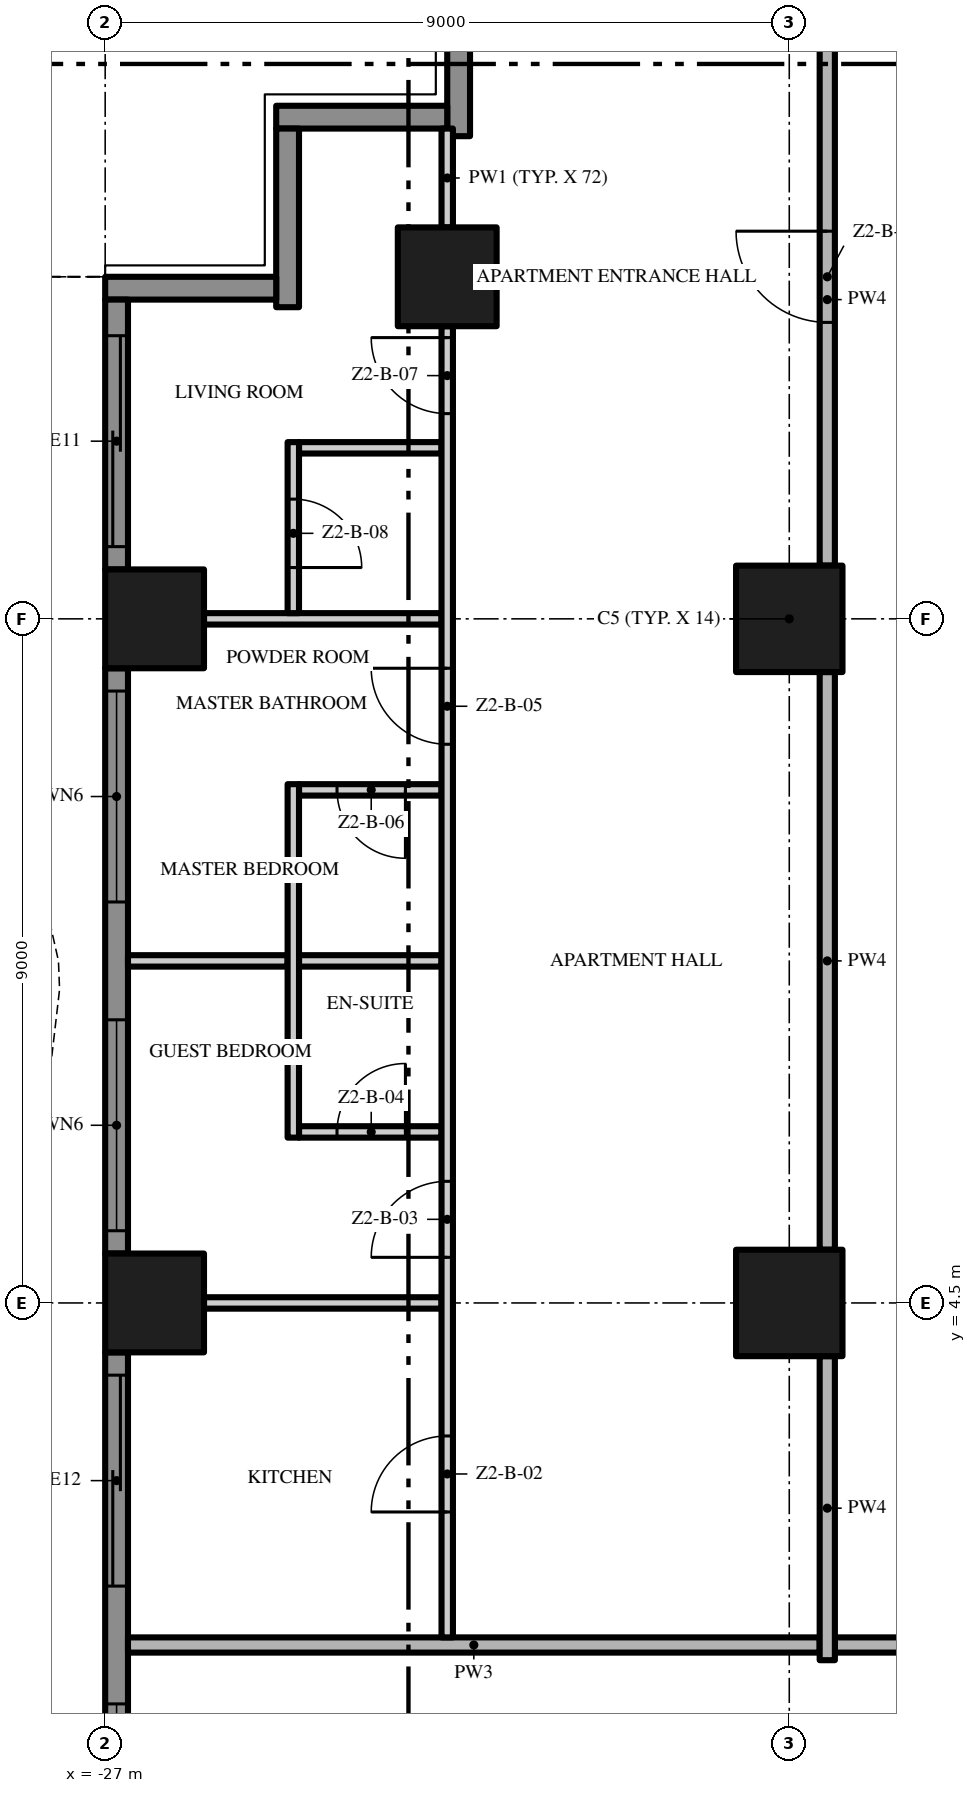
"""IFC4 building model, lengths in metres.
Left out: names, types, materials, properties, quantities, classifications, styles, units other than length and angle.
Written with IfcOpenShell. Run it as: python <this file> out.ifc"""

import sys

from ifc_helpers import new_model, si_unit, direction, frame, frame_2d, origin, origin_2d, place, context, subcontext, project, spatial, polyline, rectangle, outline, extrude, element, fill, save


model = new_model("IFC4")
c1 = context("Model", 3, precision=1e-05, world=origin(), true_north=direction((0.0, 1.0)))
c2 = subcontext(c1, "Body", "Model", "MODEL_VIEW")
j1 = project(units=[si_unit("LENGTHUNIT", "METRE"), si_unit("PLANEANGLEUNIT", "RADIAN")], contexts=[c1])
p1 = place(None, origin())
s1 = spatial("IfcSite", under=j1, at=p1, CompositionType="ELEMENT")
p2 = place(p1, origin())
s2 = spatial("IfcBuilding", under=s1, at=p2, CompositionType="ELEMENT")
p3 = place(p2, frame((0.0, 0.0, 80.8)))
s3 = spatial("IfcBuildingStorey", under=s2, at=p3, CompositionType="ELEMENT", Elevation=80.8)
for number, where, z_axis, x_axis in (
    (1, (-18.0, 13.5, 0.0), (0.0, 0.0, 1.0), (1.0, 0.0, 0.0)),
    (2, (-18.0, 4.5, 0.0), (0.0, 0.0, 1.0), (1.0, 0.0, 0.0)),
):
    element("IfcColumn", number, at=place(p3, frame(where, z_axis=z_axis, x_axis=x_axis)), inside=s3, PredefinedType="COLUMN", context=c2, shape_type="SweptSolid", body=[
        extrude(rectangle(XDim=1.4, YDim=1.4, at=origin_2d()), origin(), (0.0, 0.0, 1.0), 3.5),
    ])
for number, where, z_axis, x_axis in (
    (3, (-26.35, 13.5, 0.0), (0.0, 0.0, 1.0), (1.0, 0.0, 0.0)),
    (4, (-22.5, 18.0, 0.0), (0.0, 0.0, 1.0), (1.0, 0.0, 0.0)),
    (5, (-26.35, 4.5, 0.0), (0.0, 0.0, 1.0), (1.0, 0.0, 0.0)),
):
    element("IfcColumn", number, at=place(p3, frame(where, z_axis=z_axis, x_axis=x_axis)), inside=s3, PredefinedType="COLUMN", context=c2, shape_type="SweptSolid", body=[
        extrude(rectangle(XDim=1.3, YDim=1.3, at=origin_2d()), origin(), (0.0, 0.0, 1.0), 3.5),
    ])
p4 = place(p3, frame((-22.35, 19.85, 0.0), z_axis=(0.0, 0.0, 1.0), x_axis=(0.0, 1.0, 0.0)))
e6 = element("IfcWall", 6, at=p4, inside=s3, PredefinedType="SOLIDWALL", context=c2, shape_type="SweptSolid", body=[
    extrude(rectangle(XDim=2.35, YDim=0.3, at=frame_2d((1.175, 0.0))), origin(), (0.0, 0.0, 1.0), 3.5),
])
p5 = place(p3, frame((-24.75, 20.1, 0.0), z_axis=(0.0, 0.0, 1.0), x_axis=(1.0, 0.0, 0.0)))
e7 = element("IfcWall", 7, at=p5, inside=s3, PredefinedType="SOLIDWALL", context=c2, shape_type="SweptSolid", body=[
    extrude(rectangle(XDim=2.25, YDim=0.3, at=frame_2d((1.125, 0.0))), origin(), (0.0, 0.0, 1.0), 3.5),
])
p6 = place(p3, frame((-24.6, 17.6, 0.0), z_axis=(0.0, 0.0, 1.0), x_axis=(0.0, 1.0, 0.0)))
e8 = element("IfcWall", 8, at=p6, inside=s3, PredefinedType="SOLIDWALL", context=c2, shape_type="SweptSolid", body=[
    extrude(rectangle(XDim=2.35, YDim=0.3, at=frame_2d((1.175, 0.0))), origin(), (0.0, 0.0, 1.0), 3.5),
])
p7 = place(p3, frame((-27.0, 17.85, 0.0), z_axis=(0.0, 0.0, 1.0), x_axis=(1.0, 0.0, 0.0)))
e9 = element("IfcWall", 9, at=p7, inside=s3, PredefinedType="SOLIDWALL", context=c2, shape_type="SweptSolid", body=[
    extrude(rectangle(XDim=2.25, YDim=0.3, at=frame_2d((1.125, 0.0))), origin(), (0.0, 0.0, 1.0), 3.5),
])
p8 = place(p3, frame((-26.85, 14.15, 0.0), z_axis=(0.0, 0.0, 1.0), x_axis=(0.0, 1.0, 0.0)))
e10 = element("IfcWall", 10, at=p8, inside=s3, PredefinedType="SOLIDWALL", context=c2, shape_type="SweptSolid", body=[
    extrude(rectangle(XDim=3.55, YDim=0.3, at=frame_2d((1.775, 0.0))), origin(), (0.0, 0.0, 1.0), 3.5),
])
p9 = place(p8, frame((0.3, 0.0, 0.0)))
e11 = element("IfcOpeningElement", 11, at=p9, cuts=e10, PredefinedType="OPENING", context=c2, shape_type="SweptSolid", body=[
    extrude(rectangle(XDim=2.775, YDim=2.4, at=frame_2d((1.387, 1.2))), frame((0.0, 0.16, 0.0), z_axis=(0.0, -1.0, 0.0), x_axis=(1.0, 0.0, 0.0)), (0.0, 0.0, 1.0), 0.32),
])
p10 = place(p3, frame((-26.85, 5.15, 0.0), z_axis=(0.0, 0.0, 1.0), x_axis=(0.0, 1.0, 0.0)))
e12 = element("IfcWall", 12, at=p10, inside=s3, PredefinedType="SOLIDWALL", context=c2, shape_type="SweptSolid", body=[
    extrude(rectangle(XDim=7.7, YDim=0.3, at=frame_2d((3.85, 0.0))), origin(), (0.0, 0.0, 1.0), 3.5),
])
p11 = place(p10, frame((4.625, 0.0, 0.45)))
e13 = element("IfcOpeningElement", 13, at=p11, cuts=e12, PredefinedType="OPENING", context=c2, shape_type="SweptSolid", body=[
    extrude(rectangle(XDim=2.775, YDim=2.65, at=frame_2d((1.387, 1.325))), frame((0.0, 0.16, 0.0), z_axis=(0.0, -1.0, 0.0), x_axis=(1.0, 0.0, 0.0)), (0.0, 0.0, 1.0), 0.32),
])
p12 = place(p10, frame((0.3, 0.0, 0.45)))
e14 = element("IfcOpeningElement", 14, at=p12, cuts=e12, PredefinedType="OPENING", context=c2, shape_type="SweptSolid", body=[
    extrude(rectangle(XDim=2.775, YDim=2.65, at=frame_2d((1.387, 1.325))), frame((0.0, 0.16, 0.0), z_axis=(0.0, -1.0, 0.0), x_axis=(1.0, 0.0, 0.0)), (0.0, 0.0, 1.0), 0.32),
])
p13 = place(p3, frame((-26.85, -3.85, 0.0), z_axis=(0.0, 0.0, 1.0), x_axis=(0.0, 1.0, 0.0)))
e15 = element("IfcWall", 15, at=p13, inside=s3, PredefinedType="SOLIDWALL", context=c2, shape_type="SweptSolid", body=[
    extrude(rectangle(XDim=7.7, YDim=0.3, at=frame_2d((3.85, 0.0))), origin(), (0.0, 0.0, 1.0), 3.5),
])
p14 = place(p13, frame((4.625, 0.0, 0.0)))
e16 = element("IfcOpeningElement", 16, at=p14, cuts=e15, PredefinedType="OPENING", context=c2, shape_type="SweptSolid", body=[
    extrude(rectangle(XDim=2.775, YDim=2.4, at=frame_2d((1.387, 1.2))), frame((0.0, 0.16, 0.0), z_axis=(0.0, -1.0, 0.0), x_axis=(1.0, 0.0, 0.0)), (0.0, 0.0, 1.0), 0.32),
])
p15 = place(p13, frame((0.3, 0.0, 0.45)))
e17 = element("IfcOpeningElement", 17, at=p15, cuts=e15, PredefinedType="OPENING", context=c2, shape_type="SweptSolid", body=[
    extrude(rectangle(XDim=2.775, YDim=2.65, at=frame_2d((1.387, 1.325))), frame((0.0, 0.16, 0.0), z_axis=(0.0, -1.0, 0.0), x_axis=(1.0, 0.0, 0.0)), (0.0, 0.0, 1.0), 0.32),
])
p16 = place(p3, origin())
e18 = element("IfcWall", 18, at=p16, inside=s3, PredefinedType="USERDEFINED", context=c2, shape_type="SweptSolid", body=[
    extrude(outline(polyline([(-29.649, 18.0), (-29.985, 16.5), (-30.0, 16.125), (-29.869, 15.0), (-29.345, 13.5), (-28.612, 12.0), (-27.951, 10.5), (-27.615, 9.0), (-27.6, 8.625), (-27.731, 7.5), (-28.255, 6.0), (-28.988, 4.5), (-29.649, 3.0), (-29.985, 1.5), (-30.0, 1.125), (-29.869, 0.0), (-29.345, -1.5), (-28.612, -3.0), (-27.951, -4.5), (-27.615, -6.0), (-27.6, -6.375), (-27.731, -7.5), (-28.255, -9.0), (-28.988, -10.5), (-29.649, -12.0), (-29.985, -13.5), (-30.0, -13.875), (-29.869, -15.0), (-29.345, -16.5), (-28.612, -18.0), (-28.388, -17.89), (-29.114, -16.404), (-29.624, -14.944), (-29.749, -13.865), (-29.736, -13.533), (-29.41, -12.079), (-28.761, -10.605), (-28.024, -9.096), (-27.486, -7.556), (-27.349, -6.385), (-27.366, -5.967), (-27.713, -4.421), (-28.385, -2.895), (-29.114, -1.404), (-29.624, 0.056), (-29.749, 1.135), (-29.736, 1.467), (-29.41, 2.921), (-28.761, 4.395), (-28.024, 5.904), (-27.486, 7.444), (-27.349, 8.615), (-27.366, 9.033), (-27.713, 10.579), (-28.385, 12.105), (-29.114, 13.596), (-29.624, 15.056), (-29.749, 16.135), (-29.736, 16.467), (-29.405, 17.945), (-29.649, 18.0)])), origin(), (0.0, 0.0, 1.0), 0.9),
])
p17 = place(p3, frame((-0.1, 0.0, 0.0), z_axis=(0.0, 0.0, 1.0), x_axis=(-1.0, 0.0, 0.0)))
e19 = element("IfcWall", 19, at=p17, inside=s3, PredefinedType="PARTITIONING", context=c2, shape_type="SweptSolid", body=[
    extrude(rectangle(XDim=17.3, YDim=0.2, at=frame_2d((8.65, 0.0))), origin(), (0.0, 0.0, 1.0), 3.5),
])
p18 = place(p17, frame((8.15, 0.0, 0.0)))
e20 = element("IfcOpeningElement", 20, at=p18, cuts=e19, PredefinedType="OPENING", context=c2, shape_type="SweptSolid", body=[
    extrude(rectangle(XDim=1.5, YDim=2.4, at=frame_2d((0.75, 1.2))), frame((0.0, 0.11, 0.0), z_axis=(0.0, -1.0, 0.0), x_axis=(1.0, 0.0, 0.0)), (0.0, 0.0, 1.0), 0.22),
])
p19 = place(p3, frame((-26.7, 0.0, 0.0), z_axis=(0.0, 0.0, 1.0), x_axis=(1.0, 0.0, 0.0)))
e21 = element("IfcWall", 21, at=p19, inside=s3, PredefinedType="PARTITIONING", context=c2, shape_type="SweptSolid", body=[
    extrude(rectangle(XDim=9.1, YDim=0.2, at=frame_2d((4.55, 0.0))), origin(), (0.0, 0.0, 1.0), 3.5),
])
p20 = place(p3, frame((-25.7, 4.5, 0.0), z_axis=(0.0, 0.0, 1.0), x_axis=(1.0, 0.0, 0.0)))
e22 = element("IfcWall", 22, at=p20, inside=s3, PredefinedType="PARTITIONING", context=c2, shape_type="SweptSolid", body=[
    extrude(rectangle(XDim=3.125, YDim=0.15, at=frame_2d((1.562, 0.0))), origin(), (0.0, 0.0, 1.0), 3.5),
])
p21 = place(p3, frame((-24.45, 6.75, 0.0), z_axis=(0.0, 0.0, 1.0), x_axis=(1.0, 0.0, 0.0)))
e23 = element("IfcWall", 23, at=p21, inside=s3, PredefinedType="PARTITIONING", context=c2, shape_type="SweptSolid", body=[
    extrude(rectangle(XDim=1.875, YDim=0.15, at=frame_2d((0.938, 0.0))), origin(), (0.0, 0.0, 1.0), 3.5),
])
p22 = place(p21, frame((0.5, 0.0, 0.0)))
e24 = element("IfcOpeningElement", 24, at=p22, cuts=e23, PredefinedType="OPENING", context=c2, shape_type="SweptSolid", body=[
    extrude(rectangle(XDim=0.9, YDim=2.1, at=frame_2d((0.45, 1.05))), frame((0.0, 0.085, 0.0), z_axis=(0.0, -1.0, 0.0), x_axis=(1.0, 0.0, 0.0)), (0.0, 0.0, 1.0), 0.17),
])
p23 = place(p3, frame((-26.7, 9.0, 0.0), z_axis=(0.0, 0.0, 1.0), x_axis=(1.0, 0.0, 0.0)))
e25 = element("IfcWall", 25, at=p23, inside=s3, PredefinedType="PARTITIONING", context=c2, shape_type="SweptSolid", body=[
    extrude(rectangle(XDim=2.1, YDim=0.15, at=frame_2d((1.05, 0.0))), origin(), (0.0, 0.0, 1.0), 3.5),
])
p24 = place(p3, frame((-24.45, 9.0, 0.0), z_axis=(0.0, 0.0, 1.0), x_axis=(1.0, 0.0, 0.0)))
e26 = element("IfcWall", 26, at=p24, inside=s3, PredefinedType="PARTITIONING", context=c2, shape_type="SweptSolid", body=[
    extrude(rectangle(XDim=1.875, YDim=0.15, at=frame_2d((0.938, 0.0))), origin(), (0.0, 0.0, 1.0), 3.5),
])
p25 = place(p3, frame((-22.575, 11.25, 0.0), z_axis=(0.0, 0.0, 1.0), x_axis=(-1.0, 0.0, 0.0)))
e27 = element("IfcWall", 27, at=p25, inside=s3, PredefinedType="PARTITIONING", context=c2, shape_type="SweptSolid", body=[
    extrude(rectangle(XDim=1.875, YDim=0.15, at=frame_2d((0.938, 0.0))), origin(), (0.0, 0.0, 1.0), 3.5),
])
p26 = place(p25, frame((0.475, 0.0, 0.0)))
e28 = element("IfcOpeningElement", 28, at=p26, cuts=e27, PredefinedType="OPENING", context=c2, shape_type="SweptSolid", body=[
    extrude(rectangle(XDim=0.9, YDim=2.1, at=frame_2d((0.45, 1.05))), frame((0.0, 0.085, 0.0), z_axis=(0.0, -1.0, 0.0), x_axis=(1.0, 0.0, 0.0)), (0.0, 0.0, 1.0), 0.17),
])
p27 = place(p3, frame((-25.7, 13.5, 0.0), z_axis=(0.0, 0.0, 1.0), x_axis=(1.0, 0.0, 0.0)))
e29 = element("IfcWall", 29, at=p27, inside=s3, PredefinedType="PARTITIONING", context=c2, shape_type="SweptSolid", body=[
    extrude(rectangle(XDim=3.125, YDim=0.15, at=frame_2d((1.562, 0.0))), origin(), (0.0, 0.0, 1.0), 3.5),
])
p28 = place(p3, frame((-24.45, 15.75, 0.0), z_axis=(0.0, 0.0, 1.0), x_axis=(1.0, 0.0, 0.0)))
e30 = element("IfcWall", 30, at=p28, inside=s3, PredefinedType="PARTITIONING", context=c2, shape_type="SweptSolid", body=[
    extrude(rectangle(XDim=1.875, YDim=0.15, at=frame_2d((0.938, 0.0))), origin(), (0.0, 0.0, 1.0), 3.5),
])
p29 = place(p3, frame((-24.525, 6.675, 0.0), z_axis=(0.0, 0.0, 1.0), x_axis=(0.0, 1.0, 0.0)))
e31 = element("IfcWall", 31, at=p29, inside=s3, PredefinedType="PARTITIONING", context=c2, shape_type="SweptSolid", body=[
    extrude(rectangle(XDim=4.65, YDim=0.15, at=frame_2d((2.325, 0.0))), origin(), (0.0, 0.0, 1.0), 3.5),
])
p30 = place(p3, frame((-24.525, 15.825, 0.0), z_axis=(0.0, 0.0, 1.0), x_axis=(0.0, -1.0, 0.0)))
e32 = element("IfcWall", 32, at=p30, inside=s3, PredefinedType="PARTITIONING", context=c2, shape_type="SweptSolid", body=[
    extrude(rectangle(XDim=2.25, YDim=0.15, at=frame_2d((1.125, 0.0))), origin(), (0.0, 0.0, 1.0), 3.5),
])
p31 = place(p30, frame((0.75, 0.0, 0.0)))
e33 = element("IfcOpeningElement", 33, at=p31, cuts=e32, PredefinedType="OPENING", context=c2, shape_type="SweptSolid", body=[
    extrude(rectangle(XDim=0.9, YDim=2.1, at=frame_2d((0.45, 1.05))), frame((0.0, 0.085, 0.0), z_axis=(0.0, -1.0, 0.0), x_axis=(1.0, 0.0, 0.0)), (0.0, 0.0, 1.0), 0.17),
])
p32 = place(p3, frame((-22.5, 0.1, 0.0), z_axis=(0.0, 0.0, 1.0), x_axis=(0.0, 1.0, 0.0)))
e34 = element("IfcWall", 34, at=p32, inside=s3, PredefinedType="PARTITIONING", context=c2, shape_type="SweptSolid", body=[
    extrude(rectangle(XDim=17.25, YDim=0.15, at=frame_2d((8.625, 0.0))), origin(), (0.0, 0.0, 1.0), 3.5),
])
p33 = place(p32, frame((1.65, 0.0, 0.0)))
e35 = element("IfcOpeningElement", 35, at=p33, cuts=e34, PredefinedType="OPENING", context=c2, shape_type="SweptSolid", body=[
    extrude(rectangle(XDim=1.0, YDim=2.4, at=frame_2d((0.5, 1.2))), frame((0.0, 0.085, 0.0), z_axis=(0.0, -1.0, 0.0), x_axis=(1.0, 0.0, 0.0)), (0.0, 0.0, 1.0), 0.17),
])
p34 = place(p32, frame((5.0, 0.0, 0.0)))
e36 = element("IfcOpeningElement", 36, at=p34, cuts=e34, PredefinedType="OPENING", context=c2, shape_type="SweptSolid", body=[
    extrude(rectangle(XDim=1.0, YDim=2.4, at=frame_2d((0.5, 1.2))), frame((0.0, 0.085, 0.0), z_axis=(0.0, -1.0, 0.0), x_axis=(1.0, 0.0, 0.0)), (0.0, 0.0, 1.0), 0.17),
])
p35 = place(p32, frame((11.75, 0.0, 0.0)))
e37 = element("IfcOpeningElement", 37, at=p35, cuts=e34, PredefinedType="OPENING", context=c2, shape_type="SweptSolid", body=[
    extrude(rectangle(XDim=1.0, YDim=2.4, at=frame_2d((0.5, 1.2))), frame((0.0, 0.085, 0.0), z_axis=(0.0, -1.0, 0.0), x_axis=(1.0, 0.0, 0.0)), (0.0, 0.0, 1.0), 0.17),
])
p36 = place(p32, frame((16.1, 0.0, 0.0)))
e38 = element("IfcOpeningElement", 38, at=p36, cuts=e34, PredefinedType="OPENING", context=c2, shape_type="SweptSolid", body=[
    extrude(rectangle(XDim=1.0, YDim=2.4, at=frame_2d((0.5, 1.2))), frame((0.0, 0.085, 0.0), z_axis=(0.0, -1.0, 0.0), x_axis=(1.0, 0.0, 0.0)), (0.0, 0.0, 1.0), 0.17),
])
p37 = place(p3, frame((-22.5, 18.65, 0.0), z_axis=(0.0, 0.0, 1.0), x_axis=(0.0, 1.0, 0.0)))
e39 = element("IfcWall", 39, at=p37, inside=s3, PredefinedType="PARTITIONING", context=c2, shape_type="SweptSolid", body=[
    extrude(rectangle(XDim=1.3, YDim=0.15, at=frame_2d((0.65, 0.0))), origin(), (0.0, 0.0, 1.0), 3.5),
])
p38 = place(p3, frame((-17.5, -0.2, 0.0), z_axis=(0.0, 0.0, 1.0), x_axis=(0.0, 1.0, 0.0)))
e40 = element("IfcWall", 40, at=p38, inside=s3, PredefinedType="PARTITIONING", context=c2, shape_type="SweptSolid", body=[
    extrude(rectangle(XDim=4.0, YDim=0.2, at=frame_2d((2.0, 0.0))), origin(), (0.0, 0.0, 1.0), 3.5),
])
p39 = place(p3, frame((-17.5, 5.2, 0.0), z_axis=(0.0, 0.0, 1.0), x_axis=(0.0, 1.0, 0.0)))
e41 = element("IfcWall", 41, at=p39, inside=s3, PredefinedType="PARTITIONING", context=c2, shape_type="SweptSolid", body=[
    extrude(rectangle(XDim=7.6, YDim=0.2, at=frame_2d((3.8, 0.0))), origin(), (0.0, 0.0, 1.0), 3.5),
])
p40 = place(p3, frame((-17.5, 14.2, 0.0), z_axis=(0.0, 0.0, 1.0), x_axis=(0.0, 1.0, 0.0)))
e42 = element("IfcWall", 42, at=p40, inside=s3, PredefinedType="PARTITIONING", context=c2, shape_type="SweptSolid", body=[
    extrude(rectangle(XDim=7.0, YDim=0.2, at=frame_2d((3.5, 0.0))), origin(), (0.0, 0.0, 1.0), 3.5),
])
p41 = place(p40, frame((3.2, 0.0, 0.0)))
e43 = element("IfcOpeningElement", 43, at=p41, cuts=e42, PredefinedType="OPENING", context=c2, shape_type="SweptSolid", body=[
    extrude(rectangle(XDim=1.2, YDim=2.4, at=frame_2d((0.6, 1.2))), frame((0.0, 0.11, 0.0), z_axis=(0.0, -1.0, 0.0), x_axis=(1.0, 0.0, 0.0)), (0.0, 0.0, 1.0), 0.22),
])
p42 = place(p9, origin())
e44 = element("IfcDoor", 44, at=p42, inside=s3, OperationType="SINGLE_SWING_LEFT", PredefinedType="DOOR", context=c2, shape_type="SweptSolid", body=[
    extrude(rectangle(XDim=2.775, YDim=2.4, at=frame_2d((1.387, 1.2))), frame((0.0, 0.025, 0.0), z_axis=(0.0, -1.0, 0.0), x_axis=(1.0, 0.0, 0.0)), (0.0, 0.0, 1.0), 0.05),
])
fill(e11, e44)
p43 = place(p11, origin())
e45 = element("IfcWindow", 45, at=p43, inside=s3, PartitioningType="SINGLE_PANEL", PredefinedType="WINDOW", context=c2, shape_type="SweptSolid", body=[
    extrude(rectangle(XDim=2.775, YDim=2.65, at=frame_2d((1.387, 1.325))), frame((0.0, 0.03, 0.0), z_axis=(0.0, -1.0, 0.0), x_axis=(1.0, 0.0, 0.0)), (0.0, 0.0, 1.0), 0.06),
])
fill(e13, e45)
p44 = place(p12, origin())
e46 = element("IfcWindow", 46, at=p44, inside=s3, PartitioningType="SINGLE_PANEL", PredefinedType="WINDOW", context=c2, shape_type="SweptSolid", body=[
    extrude(rectangle(XDim=2.775, YDim=2.65, at=frame_2d((1.387, 1.325))), frame((0.0, 0.03, 0.0), z_axis=(0.0, -1.0, 0.0), x_axis=(1.0, 0.0, 0.0)), (0.0, 0.0, 1.0), 0.06),
])
fill(e14, e46)
p45 = place(p14, origin())
e47 = element("IfcDoor", 47, at=p45, inside=s3, OperationType="SINGLE_SWING_LEFT", PredefinedType="DOOR", context=c2, shape_type="SweptSolid", body=[
    extrude(rectangle(XDim=2.775, YDim=2.4, at=frame_2d((1.387, 1.2))), frame((0.0, 0.025, 0.0), z_axis=(0.0, -1.0, 0.0), x_axis=(1.0, 0.0, 0.0)), (0.0, 0.0, 1.0), 0.05),
])
fill(e16, e47)
p46 = place(p15, origin())
e48 = element("IfcWindow", 48, at=p46, inside=s3, PartitioningType="SINGLE_PANEL", PredefinedType="WINDOW", context=c2, shape_type="SweptSolid", body=[
    extrude(rectangle(XDim=2.775, YDim=2.65, at=frame_2d((1.387, 1.325))), frame((0.0, 0.03, 0.0), z_axis=(0.0, -1.0, 0.0), x_axis=(1.0, 0.0, 0.0)), (0.0, 0.0, 1.0), 0.06),
])
fill(e17, e48)
p47 = place(p41, origin())
e49 = element("IfcDoor", 49, at=p47, inside=s3, OperationType="SINGLE_SWING_RIGHT", PredefinedType="DOOR", context=c2, shape_type="SweptSolid", body=[
    extrude(rectangle(XDim=1.2, YDim=2.4, at=frame_2d((0.6, 1.2))), frame((0.0, 0.025, 0.0), z_axis=(0.0, -1.0, 0.0), x_axis=(1.0, 0.0, 0.0)), (0.0, 0.0, 1.0), 0.05),
])
fill(e43, e49)
p48 = place(p33, origin())
e50 = element("IfcDoor", 50, at=p48, inside=s3, OperationType="SINGLE_SWING_LEFT", PredefinedType="DOOR", context=c2, shape_type="SweptSolid", body=[
    extrude(rectangle(XDim=1.0, YDim=2.4, at=frame_2d((0.5, 1.2))), frame((0.0, 0.025, 0.0), z_axis=(0.0, -1.0, 0.0), x_axis=(1.0, 0.0, 0.0)), (0.0, 0.0, 1.0), 0.05),
])
fill(e35, e50)
p49 = place(p34, origin())
e51 = element("IfcDoor", 51, at=p49, inside=s3, OperationType="SINGLE_SWING_LEFT", PredefinedType="DOOR", context=c2, shape_type="SweptSolid", body=[
    extrude(rectangle(XDim=1.0, YDim=2.4, at=frame_2d((0.5, 1.2))), frame((0.0, 0.025, 0.0), z_axis=(0.0, -1.0, 0.0), x_axis=(1.0, 0.0, 0.0)), (0.0, 0.0, 1.0), 0.05),
])
fill(e36, e51)
p50 = place(p22, origin())
e52 = element("IfcDoor", 52, at=p50, inside=s3, OperationType="SINGLE_SWING_RIGHT", PredefinedType="DOOR", context=c2, shape_type="SweptSolid", body=[
    extrude(rectangle(XDim=0.9, YDim=2.1, at=frame_2d((0.45, 1.05))), frame((0.0, 0.025, 0.0), z_axis=(0.0, -1.0, 0.0), x_axis=(1.0, 0.0, 0.0)), (0.0, 0.0, 1.0), 0.05),
])
fill(e24, e52)
p51 = place(p35, origin())
e53 = element("IfcDoor", 53, at=p51, inside=s3, OperationType="SINGLE_SWING_RIGHT", PredefinedType="DOOR", context=c2, shape_type="SweptSolid", body=[
    extrude(rectangle(XDim=1.0, YDim=2.4, at=frame_2d((0.5, 1.2))), frame((0.0, 0.025, 0.0), z_axis=(0.0, -1.0, 0.0), x_axis=(1.0, 0.0, 0.0)), (0.0, 0.0, 1.0), 0.05),
])
fill(e37, e53)
p52 = place(p26, origin())
e54 = element("IfcDoor", 54, at=p52, inside=s3, OperationType="SINGLE_SWING_LEFT", PredefinedType="DOOR", context=c2, shape_type="SweptSolid", body=[
    extrude(rectangle(XDim=0.9, YDim=2.1, at=frame_2d((0.45, 1.05))), frame((0.0, 0.025, 0.0), z_axis=(0.0, -1.0, 0.0), x_axis=(1.0, 0.0, 0.0)), (0.0, 0.0, 1.0), 0.05),
])
fill(e28, e54)
p53 = place(p36, origin())
e55 = element("IfcDoor", 55, at=p53, inside=s3, OperationType="SINGLE_SWING_RIGHT", PredefinedType="DOOR", context=c2, shape_type="SweptSolid", body=[
    extrude(rectangle(XDim=1.0, YDim=2.4, at=frame_2d((0.5, 1.2))), frame((0.0, 0.025, 0.0), z_axis=(0.0, -1.0, 0.0), x_axis=(1.0, 0.0, 0.0)), (0.0, 0.0, 1.0), 0.05),
])
fill(e38, e55)
p54 = place(p31, origin())
e56 = element("IfcDoor", 56, at=p54, inside=s3, OperationType="SINGLE_SWING_RIGHT", PredefinedType="DOOR", context=c2, shape_type="SweptSolid", body=[
    extrude(rectangle(XDim=0.9, YDim=2.1, at=frame_2d((0.45, 1.05))), frame((0.0, 0.025, 0.0), z_axis=(0.0, -1.0, 0.0), x_axis=(1.0, 0.0, 0.0)), (0.0, 0.0, 1.0), 0.05),
])
fill(e33, e56)
save(model, sys.argv[1])
